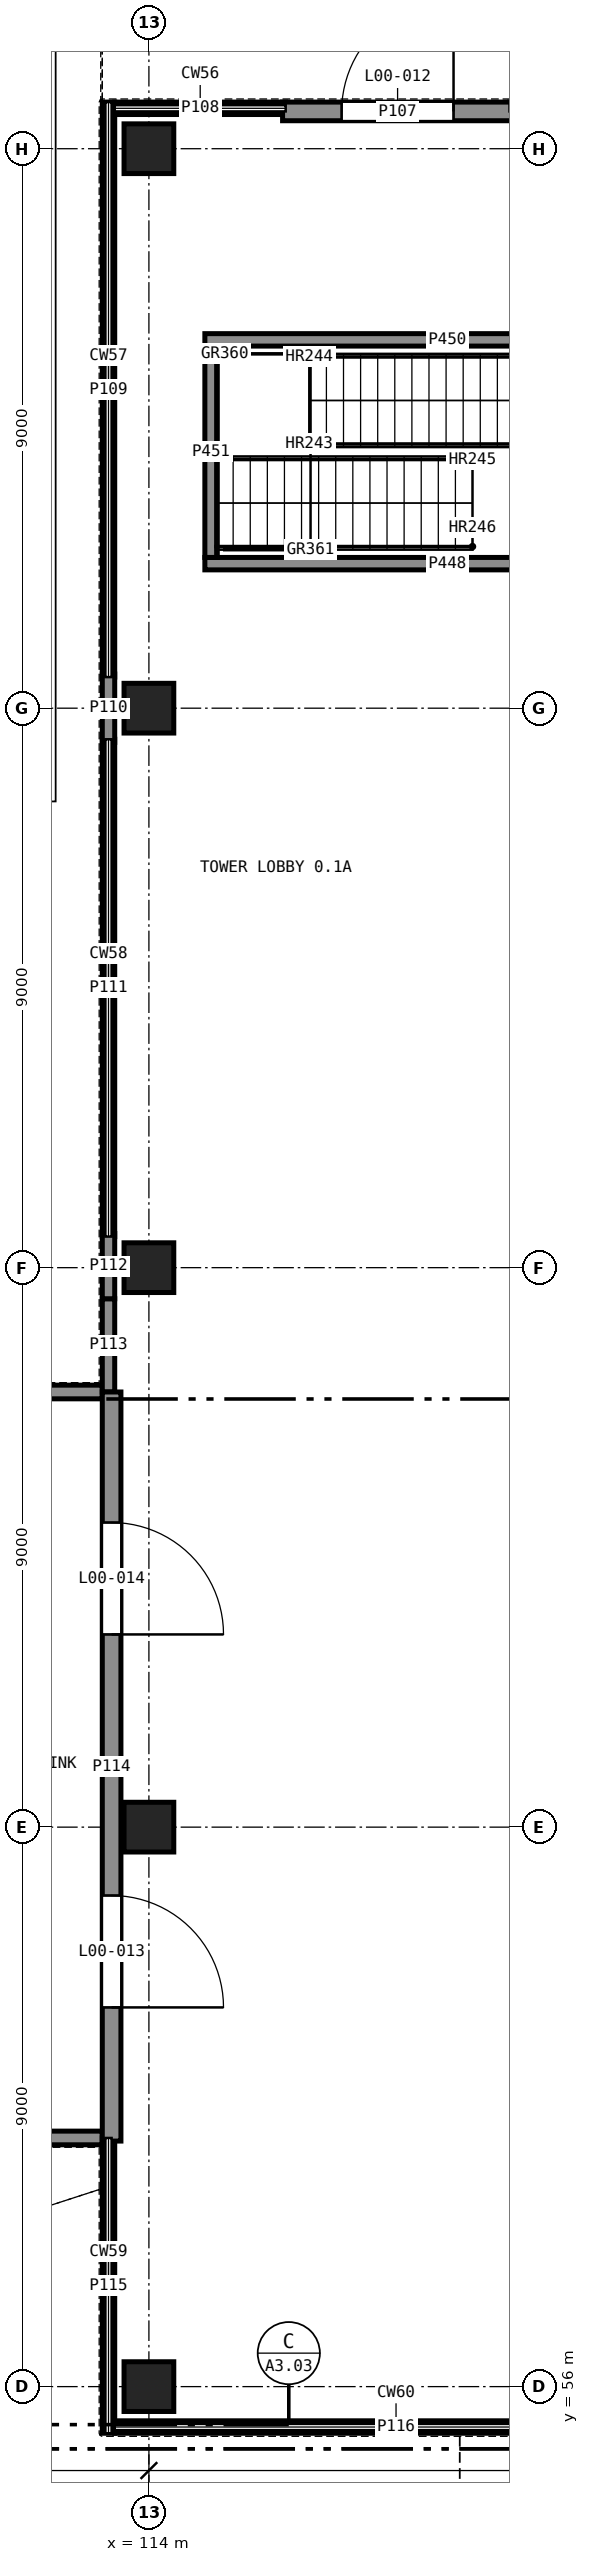
"""IFC4 building model, lengths in metres.
Left out: names, types, materials, properties, quantities, classifications, styles, units other than length and angle.
Written with IfcOpenShell. Run it as: python <this file> out.ifc"""

import sys

from ifc_helpers import new_model, si_unit, direction, frame, frame_2d, origin, origin_2d, place, context, subcontext, project, spatial, rectangle, extrude, element, fill, save


model = new_model("IFC4")
c1 = context("Model", 3, precision=1e-05, world=origin(), true_north=direction((0.0, 1.0)))
c2 = subcontext(c1, "Body", "Model", "MODEL_VIEW")
j1 = project(units=[si_unit("LENGTHUNIT", "METRE"), si_unit("PLANEANGLEUNIT", "RADIAN")], contexts=[c1])
p1 = place(None, origin())
s1 = spatial("IfcSite", under=j1, at=p1, CompositionType="ELEMENT")
p2 = place(p1, origin())
s2 = spatial("IfcBuilding", under=s1, at=p2, CompositionType="ELEMENT")
p3 = place(p2, origin())
s3 = spatial("IfcBuildingStorey", under=s2, at=p3, CompositionType="ELEMENT", Elevation=0.0)
for number, where, z_axis, x_axis in (
    (1, (114.0, 56.0, 0.0), (0.0, 0.0, 1.0), (1.0, 0.0, 0.0)),
    (2, (114.0, 65.0, 0.0), (0.0, 0.0, 1.0), (1.0, 0.0, 0.0)),
    (3, (114.0, 74.0, 0.0), (0.0, 0.0, 1.0), (1.0, 0.0, 0.0)),
    (4, (114.0, 83.0, 0.0), (0.0, 0.0, 1.0), (1.0, 0.0, 0.0)),
    (5, (114.0, 92.0, 0.0), (0.0, 0.0, 1.0), (1.0, 0.0, 0.0)),
):
    element("IfcColumn", number, at=place(p3, frame(where, z_axis=z_axis, x_axis=x_axis)), inside=s3, PredefinedType="COLUMN", context=c2, shape_type="SweptSolid", body=[
        extrude(rectangle(XDim=0.8, YDim=0.8, at=origin_2d()), origin(), (0.0, 0.0, 1.0), 5.5),
    ])
for number, where, z_axis, x_axis in (
    (6, (110.338, 60.0, 0.0), (0.0, 0.0, 1.0), (1.0, 0.0, 0.0)),
    (7, (110.338, 72.0, 0.0), (0.0, 0.0, 1.0), (1.0, 0.0, 0.0)),
):
    element("IfcWall", number, at=place(p3, frame(where, z_axis=z_axis, x_axis=x_axis)), inside=s3, PredefinedType="SOLIDWALL", context=c2, shape_type="SweptSolid", body=[
        extrude(rectangle(XDim=2.912, YDim=0.22, at=frame_2d((1.456, 0.0))), origin(), (0.0, 0.0, 1.0), 5.2),
    ])
p4 = place(p3, frame((122.5, 92.65, 0.0), z_axis=(0.0, 0.0, 1.0), x_axis=(-1.0, 0.0, 0.0)))
e8 = element("IfcWall", 8, at=p4, inside=s3, PredefinedType="SOLIDWALL", context=c2, shape_type="SweptSolid", body=[
    extrude(rectangle(XDim=2.7, YDim=0.2, at=frame_2d((1.35, 0.0))), origin(), (0.0, 0.0, 1.0), 1.2),
])
p5 = place(p3, frame((119.85, 92.6, 0.0), z_axis=(0.0, 0.0, 1.0), x_axis=(-1.0, 0.0, 0.0)))
e9 = element("IfcWall", 9, at=p5, inside=s3, PredefinedType="SOLIDWALL", context=c2, shape_type="SweptSolid", body=[
    extrude(rectangle(XDim=3.7, YDim=0.3, at=frame_2d((1.85, 0.0))), origin(), (0.0, 0.0, 1.0), 5.25),
])
p6 = place(p5, frame((0.95, 0.0, 0.0)))
e10 = element("IfcOpeningElement", 10, at=p6, cuts=e9, PredefinedType="OPENING", context=c2, shape_type="SweptSolid", body=[
    extrude(rectangle(XDim=1.8, YDim=2.4, at=frame_2d((0.9, 1.2))), frame((0.0, 0.16, 0.0), z_axis=(0.0, -1.0, 0.0), x_axis=(1.0, 0.0, 0.0)), (0.0, 0.0, 1.0), 0.32),
])
p7 = place(p3, frame((116.2, 92.65, 0.0), z_axis=(0.0, 0.0, 1.0), x_axis=(-1.0, 0.0, 0.0)))
e11 = element("IfcWall", 11, at=p7, inside=s3, PredefinedType="SOLIDWALL", context=c2, shape_type="SweptSolid", body=[
    extrude(rectangle(XDim=2.75, YDim=0.2, at=frame_2d((1.375, 0.0))), origin(), (0.0, 0.0, 1.0), 1.2),
])
p8 = place(p3, frame((113.35, 92.75, 0.0), z_axis=(0.0, 0.0, 1.0), x_axis=(0.0, -1.0, 0.0)))
e12 = element("IfcWall", 12, at=p8, inside=s3, PredefinedType="SOLIDWALL", context=c2, shape_type="SweptSolid", body=[
    extrude(rectangle(XDim=9.25, YDim=0.2, at=frame_2d((4.625, 0.0))), origin(), (0.0, 0.0, 1.0), 1.2),
])
p9 = place(p3, frame((113.35, 83.55, 0.0), z_axis=(0.0, 0.0, 1.0), x_axis=(0.0, -1.0, 0.0)))
e13 = element("IfcWall", 13, at=p9, inside=s3, PredefinedType="SOLIDWALL", context=c2, shape_type="SweptSolid", body=[
    extrude(rectangle(XDim=1.1, YDim=0.2, at=frame_2d((0.55, 0.0))), origin(), (0.0, 0.0, 1.0), 5.25),
])
p10 = place(p3, frame((113.35, 82.5, 0.0), z_axis=(0.0, 0.0, 1.0), x_axis=(0.0, -1.0, 0.0)))
e14 = element("IfcWall", 14, at=p10, inside=s3, PredefinedType="SOLIDWALL", context=c2, shape_type="SweptSolid", body=[
    extrude(rectangle(XDim=8.0, YDim=0.2, at=frame_2d((4.0, 0.0))), origin(), (0.0, 0.0, 1.0), 1.2),
])
p11 = place(p3, frame((113.35, 74.55, 0.0), z_axis=(0.0, 0.0, 1.0), x_axis=(0.0, -1.0, 0.0)))
e15 = element("IfcWall", 15, at=p11, inside=s3, PredefinedType="SOLIDWALL", context=c2, shape_type="SweptSolid", body=[
    extrude(rectangle(XDim=1.05, YDim=0.2, at=frame_2d((0.525, 0.0))), origin(), (0.0, 0.0, 1.0), 5.25),
])
p12 = place(p3, frame((113.35, 73.5, 0.0), z_axis=(0.0, 0.0, 1.0), x_axis=(0.0, -1.0, 0.0)))
e16 = element("IfcWall", 16, at=p12, inside=s3, PredefinedType="SOLIDWALL", context=c2, shape_type="SweptSolid", body=[
    extrude(rectangle(XDim=1.5, YDim=0.2, at=frame_2d((0.75, 0.0))), origin(), (0.0, 0.0, 1.0), 5.25),
])
p13 = place(p3, frame((113.4, 72.0, 0.0), z_axis=(0.0, 0.0, 1.0), x_axis=(0.0, -1.0, 0.0)))
e17 = element("IfcWall", 17, at=p13, inside=s3, PredefinedType="SOLIDWALL", context=c2, shape_type="SweptSolid", body=[
    extrude(rectangle(XDim=12.05, YDim=0.3, at=frame_2d((6.025, 0.0))), origin(), (0.0, 0.0, 1.0), 5.25),
])
p14 = place(p13, frame((8.1, 0.0, 0.0)))
e18 = element("IfcOpeningElement", 18, at=p14, cuts=e17, PredefinedType="OPENING", context=c2, shape_type="SweptSolid", body=[
    extrude(rectangle(XDim=1.8, YDim=2.1, at=frame_2d((0.9, 1.05))), frame((0.0, 0.16, 0.0), z_axis=(0.0, -1.0, 0.0), x_axis=(1.0, 0.0, 0.0)), (0.0, 0.0, 1.0), 0.32),
])
p15 = place(p13, frame((2.1, 0.0, 0.0)))
e19 = element("IfcOpeningElement", 19, at=p15, cuts=e17, PredefinedType="OPENING", context=c2, shape_type="SweptSolid", body=[
    extrude(rectangle(XDim=1.8, YDim=2.1, at=frame_2d((0.9, 1.05))), frame((0.0, 0.16, 0.0), z_axis=(0.0, -1.0, 0.0), x_axis=(1.0, 0.0, 0.0)), (0.0, 0.0, 1.0), 0.32),
])
p16 = place(p3, frame((113.35, 60.0, 0.0), z_axis=(0.0, 0.0, 1.0), x_axis=(0.0, -1.0, 0.0)))
e20 = element("IfcWall", 20, at=p16, inside=s3, PredefinedType="SOLIDWALL", context=c2, shape_type="SweptSolid", body=[
    extrude(rectangle(XDim=4.75, YDim=0.2, at=frame_2d((2.375, 0.0))), origin(), (0.0, 0.0, 1.0), 1.2),
])
p17 = place(p3, frame((113.45, 55.35, 0.0), z_axis=(0.0, 0.0, 1.0), x_axis=(1.0, 0.0, 0.0)))
e21 = element("IfcWall", 21, at=p17, inside=s3, PredefinedType="SOLIDWALL", context=c2, shape_type="SweptSolid", body=[
    extrude(rectangle(XDim=9.05, YDim=0.2, at=frame_2d((4.525, 0.0))), origin(), (0.0, 0.0, 1.0), 1.2),
])
p18 = place(p3, frame((114.9, 85.325, 0.0), z_axis=(0.0, 0.0, 1.0), x_axis=(1.0, 0.0, 0.0)))
e22 = element("IfcWall", 22, at=p18, inside=s3, PredefinedType="SHEAR", context=c2, shape_type="SweptSolid", body=[
    extrude(rectangle(XDim=7.8, YDim=0.2, at=frame_2d((3.9, 0.0))), origin(), (0.0, 0.0, 1.0), 5.25),
])
p19 = place(p18, frame((6.2, 0.0, 0.0)))
e23 = element("IfcOpeningElement", 23, at=p19, cuts=e22, PredefinedType="OPENING", context=c2, shape_type="SweptSolid", body=[
    extrude(rectangle(XDim=1.0, YDim=2.1, at=frame_2d((0.5, 1.05))), frame((0.0, 0.11, 0.0), z_axis=(0.0, -1.0, 0.0), x_axis=(1.0, 0.0, 0.0)), (0.0, 0.0, 1.0), 0.22),
])
p20 = place(p3, frame((122.7, 88.925, 0.0), z_axis=(0.0, 0.0, 1.0), x_axis=(-1.0, 0.0, 0.0)))
e24 = element("IfcWall", 24, at=p20, inside=s3, PredefinedType="SHEAR", context=c2, shape_type="SweptSolid", body=[
    extrude(rectangle(XDim=7.8, YDim=0.2, at=frame_2d((3.9, 0.0))), origin(), (0.0, 0.0, 1.0), 5.25),
])
p21 = place(p3, frame((115.0, 88.825, 0.0), z_axis=(0.0, 0.0, 1.0), x_axis=(0.0, -1.0, 0.0)))
e25 = element("IfcWall", 25, at=p21, inside=s3, PredefinedType="SHEAR", context=c2, shape_type="SweptSolid", body=[
    extrude(rectangle(XDim=3.4, YDim=0.2, at=frame_2d((1.7, 0.0))), origin(), (0.0, 0.0, 1.0), 5.25),
])
p22 = place(p6, frame((1.8, 0.0, 0.0), z_axis=(0.0, 0.0, 1.0), x_axis=(-1.0, 0.0, 0.0)))
e26 = element("IfcDoor", 26, at=p22, inside=s3, OperationType="DOUBLE_DOOR_SINGLE_SWING", PredefinedType="DOOR", context=c2, shape_type="SweptSolid", body=[
    extrude(rectangle(XDim=1.8, YDim=2.4, at=frame_2d((0.9, 1.2))), frame((0.0, 0.025, 0.0), z_axis=(0.0, -1.0, 0.0), x_axis=(1.0, 0.0, 0.0)), (0.0, 0.0, 1.0), 0.05),
])
fill(e10, e26)
p23 = place(p14, origin())
e27 = element("IfcDoor", 27, at=p23, inside=s3, OperationType="DOUBLE_DOOR_SINGLE_SWING", PredefinedType="DOOR", context=c2, shape_type="SweptSolid", body=[
    extrude(rectangle(XDim=1.8, YDim=2.1, at=frame_2d((0.9, 1.05))), frame((0.0, 0.025, 0.0), z_axis=(0.0, -1.0, 0.0), x_axis=(1.0, 0.0, 0.0)), (0.0, 0.0, 1.0), 0.05),
])
fill(e18, e27)
p24 = place(p15, origin())
e28 = element("IfcDoor", 28, at=p24, inside=s3, OperationType="DOUBLE_DOOR_SINGLE_SWING", PredefinedType="DOOR", context=c2, shape_type="SweptSolid", body=[
    extrude(rectangle(XDim=1.8, YDim=2.1, at=frame_2d((0.9, 1.05))), frame((0.0, 0.025, 0.0), z_axis=(0.0, -1.0, 0.0), x_axis=(1.0, 0.0, 0.0)), (0.0, 0.0, 1.0), 0.05),
])
fill(e19, e28)
save(model, sys.argv[1])
